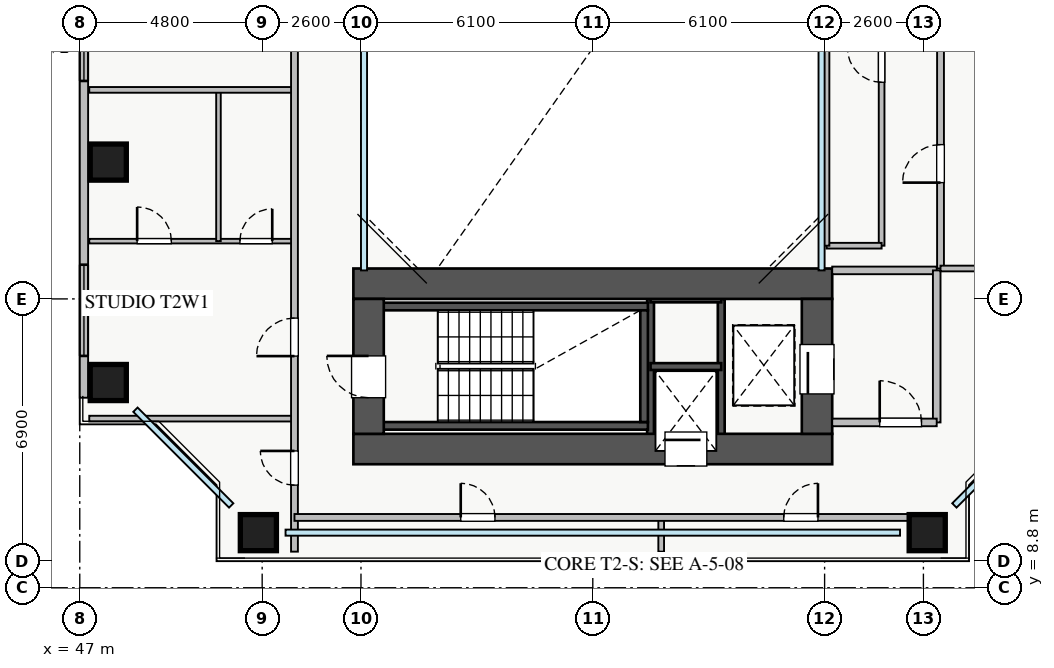
"""IFC4 building model, lengths in metres.
Left out: names, types, materials, properties, quantities, classifications, styles, units other than length and angle.
Written with IfcOpenShell. Run it as: python <this file> out.ifc"""

import sys

from ifc_helpers import new_model, si_unit, direction, frame, frame_2d, origin, origin_2d, place, context, subcontext, project, spatial, rectangle, extrude, source, transform, mapped, element, fill, save


model = new_model("IFC4")
c1 = context("Model", 3, precision=1e-05, world=origin(), true_north=direction((0.0, 1.0)))
c2 = subcontext(c1, "Body", "Model", "MODEL_VIEW")
j1 = project(units=[si_unit("LENGTHUNIT", "METRE"), si_unit("PLANEANGLEUNIT", "RADIAN")], contexts=[c1])
p1 = place(None, origin())
s1 = spatial("IfcSite", under=j1, at=p1, CompositionType="ELEMENT")
p2 = place(p1, origin())
s2 = spatial("IfcBuilding", under=s1, at=p2, CompositionType="ELEMENT")
p3 = place(p2, frame((0.0, 0.0, 50.25)))
s3 = spatial("IfcBuildingStorey", under=s2, at=p3, CompositionType="ELEMENT", Elevation=50.25)
for number, where, z_axis, x_axis in (
    (1, (62.02, 12.45, 0.0), (0.0, 0.0, 1.0), (0.0, 1.0, 0.0)),
    (2, (63.88, 12.45, 0.0), (0.0, 0.0, 1.0), (0.0, 1.0, 0.0)),
):
    element("IfcWall", number, at=place(p3, frame(where, z_axis=z_axis, x_axis=x_axis)), inside=s3, PredefinedType="SHEAR", context=c2, shape_type="SweptSolid", body=[
        extrude(rectangle(XDim=3.95, YDim=0.18, at=frame_2d((1.975, 0.0))), origin(), (0.0, 0.0, 1.0), 3.07),
    ])
for number, where, z_axis, x_axis in (
    (3, (62.02, 14.62, 0.0), (0.0, 0.0, 1.0), (1.0, 0.0, 0.0)),
    (4, (62.02, 16.4, 0.0), (0.0, 0.0, 1.0), (1.0, 0.0, 0.0)),
):
    element("IfcWall", number, at=place(p3, frame(where, z_axis=z_axis, x_axis=x_axis)), inside=s3, PredefinedType="SHEAR", context=c2, shape_type="SweptSolid", body=[
        extrude(rectangle(XDim=1.86, YDim=0.18, at=frame_2d((0.93, 0.0))), origin(), (0.0, 0.0, 1.0), 3.07),
    ])
for number, where, z_axis, x_axis in (
    (5, (54.8, 13.06, 0.0), (0.0, 0.0, 1.0), (1.0, 0.0, 0.0)),
    (6, (54.8, 16.2, 0.0), (0.0, 0.0, 1.0), (1.0, 0.0, 0.0)),
):
    element("IfcWall", number, at=place(p3, frame(where, z_axis=z_axis, x_axis=x_axis)), inside=s3, PredefinedType="SHEAR", context=c2, shape_type="SweptSolid", body=[
        extrude(rectangle(XDim=7.15, YDim=0.2, at=frame_2d((3.575, 0.0))), origin(), (0.0, 0.0, 1.0), 3.25),
    ])
p4 = place(p3, frame((61.85, 13.16, 0.0), z_axis=(0.0, 0.0, 1.0), x_axis=(0.0, 1.0, 0.0)))
e7 = element("IfcWall", 7, at=p4, inside=s3, PredefinedType="SHEAR", context=c2, shape_type="SweptSolid", body=[
    extrude(rectangle(XDim=2.94, YDim=0.2, at=frame_2d((1.47, 0.0))), origin(), (0.0, 0.0, 1.0), 3.25),
])
p5 = place(p3, frame((54.2, 12.45, 0.0), z_axis=(0.0, 0.0, 1.0), x_axis=(1.0, 0.0, 0.0)))
e8 = element("IfcWall", 8, at=p5, inside=s3, PredefinedType="SHEAR", context=c2, shape_type="SweptSolid", body=[
    extrude(rectangle(XDim=12.6, YDim=0.8, at=frame_2d((6.3, 0.0))), origin(), (0.0, 0.0, 1.0), 3.25),
])
p6 = place(p5, frame((8.2, 0.0, 0.0)))
e9 = element("IfcOpeningElement", 9, at=p6, cuts=e8, PredefinedType="OPENING", context=c2, shape_type="SweptSolid", body=[
    extrude(rectangle(XDim=1.1, YDim=2.05, at=frame_2d((0.55, 1.025))), frame((0.0, 0.41, 0.0), z_axis=(0.0, -1.0, 0.0), x_axis=(1.0, 0.0, 0.0)), (0.0, 0.0, 1.0), 0.82),
])
p7 = place(p3, frame((54.2, 16.8, 0.0), z_axis=(0.0, 0.0, 1.0), x_axis=(1.0, 0.0, 0.0)))
e10 = element("IfcWall", 10, at=p7, inside=s3, PredefinedType="SHEAR", context=c2, shape_type="SweptSolid", body=[
    extrude(rectangle(XDim=12.6, YDim=0.8, at=frame_2d((6.3, 0.0))), origin(), (0.0, 0.0, 1.0), 3.25),
])
p8 = place(p3, frame((54.6, 12.85, 0.0), z_axis=(0.0, 0.0, 1.0), x_axis=(0.0, 1.0, 0.0)))
e11 = element("IfcWall", 11, at=p8, inside=s3, PredefinedType="SHEAR", context=c2, shape_type="SweptSolid", body=[
    extrude(rectangle(XDim=3.55, YDim=0.8, at=frame_2d((1.775, 0.0))), origin(), (0.0, 0.0, 1.0), 3.25),
])
p9 = place(p8, frame((0.95, 0.0, 0.0)))
e12 = element("IfcOpeningElement", 12, at=p9, cuts=e11, PredefinedType="OPENING", context=c2, shape_type="SweptSolid", body=[
    extrude(rectangle(XDim=1.1, YDim=2.05, at=frame_2d((0.55, 1.025))), frame((0.0, 0.41, 0.0), z_axis=(0.0, -1.0, 0.0), x_axis=(1.0, 0.0, 0.0)), (0.0, 0.0, 1.0), 0.82),
])
p10 = place(p3, frame((66.4, 12.85, 0.0), z_axis=(0.0, 0.0, 1.0), x_axis=(0.0, 1.0, 0.0)))
e13 = element("IfcWall", 13, at=p10, inside=s3, PredefinedType="SHEAR", context=c2, shape_type="SweptSolid", body=[
    extrude(rectangle(XDim=3.55, YDim=0.8, at=frame_2d((1.775, 0.0))), origin(), (0.0, 0.0, 1.0), 3.25),
])
p11 = place(p10, frame((1.05, 0.0, 0.0)))
e14 = element("IfcOpeningElement", 14, at=p11, cuts=e13, PredefinedType="OPENING", context=c2, shape_type="SweptSolid", body=[
    extrude(rectangle(XDim=1.3, YDim=2.05, at=frame_2d((0.65, 1.025))), frame((0.0, 0.41, 0.0), z_axis=(0.0, -1.0, 0.0), x_axis=(1.0, 0.0, 0.0)), (0.0, 0.0, 1.0), 0.82),
])
m1 = source(origin(), c2, "Body", "SweptSolid", [
    extrude(rectangle(XDim=0.95, YDim=0.95, at=origin_2d()), origin(), (0.0, 0.0, 1.0), 3.25),
])
for number, where, z_axis, x_axis in (
    (15, (51.7, 10.25, 0.0), (0.0, 0.0, 1.0), (1.0, 0.0, 0.0)),
    (16, (69.3, 10.25, 0.0), (0.0, 0.0, 1.0), (1.0, 0.0, 0.0)),
    (17, (47.75, 14.2, 0.0), (0.0, 0.0, 1.0), (1.0, 0.0, 0.0)),
    (18, (47.75, 20.0, 0.0), (0.0, 0.0, 1.0), (1.0, 0.0, 0.0)),
):
    element("IfcColumn", number, at=place(p3, frame(where, z_axis=z_axis, x_axis=x_axis)), inside=s3, PredefinedType="COLUMN", context=c2, shape_type="MappedRepresentation", body=[
        mapped(m1, transform((0.0, 0.0, 0.0), x_axis=(1.0, 0.0, 0.0), y_axis=(0.0, 1.0, 0.0), z_axis=(0.0, 0.0, 1.0), scale=1.0)),
    ])
p12 = place(p3, frame((47.11, 13.8, 0.0), z_axis=(0.0, 0.0, 1.0), x_axis=(0.0, 1.0, 0.0)))
e19 = element("IfcWall", 19, at=p12, inside=s3, PredefinedType="STANDARD", context=c2, shape_type="SweptSolid", body=[
    extrude(rectangle(XDim=18.4, YDim=0.22, at=frame_2d((9.2, 0.0))), origin(), (0.0, 0.0, 1.0), 2.61),
])
p13 = place(p12, frame((1.1, 0.0, 0.9)))
e20 = element("IfcOpeningElement", 20, at=p13, cuts=e19, PredefinedType="OPENING", context=c2, shape_type="SweptSolid", body=[
    extrude(rectangle(XDim=2.4, YDim=1.48, at=frame_2d((1.2, 0.74))), frame((0.0, 0.12, 0.0), z_axis=(0.0, -1.0, 0.0), x_axis=(1.0, 0.0, 0.0)), (0.0, 0.0, 1.0), 0.24),
])
p14 = place(p12, frame((15.05, 0.0, 0.9)))
e21 = element("IfcOpeningElement", 21, at=p14, cuts=e19, PredefinedType="OPENING", context=c2, shape_type="SweptSolid", body=[
    extrude(rectangle(XDim=2.1, YDim=1.48, at=frame_2d((1.05, 0.74))), frame((0.0, 0.12, 0.0), z_axis=(0.0, -1.0, 0.0), x_axis=(1.0, 0.0, 0.0)), (0.0, 0.0, 1.0), 0.24),
])
p15 = place(p12, frame((8.335, 0.0, 0.9)))
e22 = element("IfcOpeningElement", 22, at=p15, cuts=e19, PredefinedType="OPENING", context=c2, shape_type="SweptSolid", body=[
    extrude(rectangle(XDim=0.9, YDim=1.2, at=frame_2d((0.45, 0.6))), frame((0.0, 0.12, 0.0), z_axis=(0.0, -1.0, 0.0), x_axis=(1.0, 0.0, 0.0)), (0.0, 0.0, 1.0), 0.24),
])
p16 = place(p3, frame((66.8, 17.15, 0.0), z_axis=(0.0, 0.0, 1.0), x_axis=(1.0, 0.0, 0.0)))
e23 = element("IfcWall", 23, at=p16, inside=s3, PredefinedType="PARTITIONING", context=c2, shape_type="SweptSolid", body=[
    extrude(rectangle(XDim=2.75, YDim=0.2, at=frame_2d((1.375, 0.0))), origin(), (0.0, 0.0, 1.0), 3.07),
])
p17 = place(p3, frame((69.55, 13.15, 0.0), z_axis=(0.0, 0.0, 1.0), x_axis=(0.0, 1.0, 0.0)))
e24 = element("IfcWall", 24, at=p17, inside=s3, PredefinedType="PARTITIONING", context=c2, shape_type="SweptSolid", body=[
    extrude(rectangle(XDim=4.0, YDim=0.2, at=frame_2d((2.0, 0.0))), origin(), (0.0, 0.0, 1.0), 2.615),
])
p18 = place(p3, frame((66.8, 13.15, 0.0), z_axis=(0.0, 0.0, 1.0), x_axis=(1.0, 0.0, 0.0)))
e25 = element("IfcWall", 25, at=p18, inside=s3, PredefinedType="PARTITIONING", context=c2, shape_type="SweptSolid", body=[
    extrude(rectangle(XDim=2.75, YDim=0.2, at=frame_2d((1.375, 0.0))), origin(), (0.0, 0.0, 1.0), 3.07),
])
p19 = place(p18, frame((1.25, 0.0, 0.0)))
e26 = element("IfcOpeningElement", 26, at=p19, cuts=e25, PredefinedType="OPENING", context=c2, shape_type="SweptSolid", body=[
    extrude(rectangle(XDim=1.1, YDim=2.05, at=frame_2d((0.55, 1.025))), frame((0.0, 0.11, 0.0), z_axis=(0.0, -1.0, 0.0), x_axis=(1.0, 0.0, 0.0)), (0.0, 0.0, 1.0), 0.22),
])
p20 = place(p3, frame((47.25, 13.25, 0.0), z_axis=(0.0, 0.0, 1.0), x_axis=(1.0, 0.0, 0.0)))
e27 = element("IfcWall", 27, at=p20, inside=s3, PredefinedType="PARTITIONING", context=c2, shape_type="SweptSolid", body=[
    extrude(rectangle(XDim=5.4, YDim=0.15, at=frame_2d((2.7, 0.0))), origin(), (0.0, 0.0, 1.0), 3.07),
])
p21 = place(p3, frame((47.25, 17.92, 0.0), z_axis=(0.0, 0.0, 1.0), x_axis=(1.0, 0.0, 0.0)))
e28 = element("IfcWall", 28, at=p21, inside=s3, PredefinedType="PLUMBINGWALL", context=c2, shape_type="SweptSolid", body=[
    extrude(rectangle(XDim=5.4, YDim=0.12, at=frame_2d((2.7, 0.0))), origin(), (0.0, 0.0, 1.0), 3.07),
])
p22 = place(p21, frame((1.26, 0.0, 0.0)))
e29 = element("IfcOpeningElement", 29, at=p22, cuts=e28, PredefinedType="OPENING", context=c2, shape_type="SweptSolid", body=[
    extrude(rectangle(XDim=0.9, YDim=2.05, at=frame_2d((0.45, 1.025))), frame((0.0, 0.07, 0.0), z_axis=(0.0, -1.0, 0.0), x_axis=(1.0, 0.0, 0.0)), (0.0, 0.0, 1.0), 0.14),
])
p23 = place(p21, frame((3.965, 0.0, 0.0)))
e30 = element("IfcOpeningElement", 30, at=p23, cuts=e28, PredefinedType="OPENING", context=c2, shape_type="SweptSolid", body=[
    extrude(rectangle(XDim=0.85, YDim=2.05, at=frame_2d((0.425, 1.025))), frame((0.0, 0.07, 0.0), z_axis=(0.0, -1.0, 0.0), x_axis=(1.0, 0.0, 0.0)), (0.0, 0.0, 1.0), 0.14),
])
p24 = place(p3, frame((50.65, 17.92, 0.0), z_axis=(0.0, 0.0, 1.0), x_axis=(0.0, 1.0, 0.0)))
e31 = element("IfcWall", 31, at=p24, inside=s3, PredefinedType="PLUMBINGWALL", context=c2, shape_type="SweptSolid", body=[
    extrude(rectangle(XDim=3.98, YDim=0.12, at=frame_2d((1.99, 0.0))), origin(), (0.0, 0.0, 1.0), 3.07),
])
p25 = place(p3, frame((47.25, 21.9, 0.0), z_axis=(0.0, 0.0, 1.0), x_axis=(1.0, 0.0, 0.0)))
e32 = element("IfcWall", 32, at=p25, inside=s3, PredefinedType="PARTITIONING", context=c2, shape_type="SweptSolid", body=[
    extrude(rectangle(XDim=5.4, YDim=0.15, at=frame_2d((2.7, 0.0))), origin(), (0.0, 0.0, 1.0), 3.07),
])
p26 = place(p3, frame((52.65, 9.75, 0.0), z_axis=(0.0, 0.0, 1.0), x_axis=(0.0, 1.0, 0.0)))
e33 = element("IfcWall", 33, at=p26, inside=s3, PredefinedType="PARTITIONING", context=c2, shape_type="SweptSolid", body=[
    extrude(rectangle(XDim=26.5, YDim=0.18, at=frame_2d((13.25, 0.0))), origin(), (0.0, 0.0, 1.0), 3.07),
])
p27 = place(p26, frame((23.85, 0.0, 0.0)))
e34 = element("IfcOpeningElement", 34, at=p27, cuts=e33, PredefinedType="OPENING", context=c2, shape_type="SweptSolid", body=[
    extrude(rectangle(XDim=0.9, YDim=2.05, at=frame_2d((0.45, 1.025))), frame((0.0, 0.1, 0.0), z_axis=(0.0, -1.0, 0.0), x_axis=(1.0, 0.0, 0.0)), (0.0, 0.0, 1.0), 0.2),
])
p28 = place(p26, frame((1.75, 0.0, 0.0)))
e35 = element("IfcOpeningElement", 35, at=p28, cuts=e33, PredefinedType="OPENING", context=c2, shape_type="SweptSolid", body=[
    extrude(rectangle(XDim=0.9, YDim=2.05, at=frame_2d((0.45, 1.025))), frame((0.0, 0.1, 0.0), z_axis=(0.0, -1.0, 0.0), x_axis=(1.0, 0.0, 0.0)), (0.0, 0.0, 1.0), 0.2),
])
p29 = place(p26, frame((5.145, 0.0, 0.0)))
e36 = element("IfcOpeningElement", 36, at=p29, cuts=e33, PredefinedType="OPENING", context=c2, shape_type="SweptSolid", body=[
    extrude(rectangle(XDim=1.0, YDim=2.05, at=frame_2d((0.5, 1.025))), frame((0.0, 0.1, 0.0), z_axis=(0.0, -1.0, 0.0), x_axis=(1.0, 0.0, 0.0)), (0.0, 0.0, 1.0), 0.2),
])
p30 = place(p26, frame((14.39, 0.0, 0.0)))
e37 = element("IfcOpeningElement", 37, at=p30, cuts=e33, PredefinedType="OPENING", context=c2, shape_type="SweptSolid", body=[
    extrude(rectangle(XDim=1.0, YDim=2.05, at=frame_2d((0.5, 1.025))), frame((0.0, 0.1, 0.0), z_axis=(0.0, -1.0, 0.0), x_axis=(1.0, 0.0, 0.0)), (0.0, 0.0, 1.0), 0.2),
])
p31 = place(p3, frame((69.65, 17.2, 0.0), z_axis=(0.0, 0.0, 1.0), x_axis=(0.0, 1.0, 0.0)))
e38 = element("IfcWall", 38, at=p31, inside=s3, PredefinedType="PARTITIONING", context=c2, shape_type="SweptSolid", body=[
    extrude(rectangle(XDim=11.6, YDim=0.18, at=frame_2d((5.8, 0.0))), origin(), (0.0, 0.0, 1.0), 3.07),
])
p32 = place(p31, frame((2.26, 0.0, 0.0)))
e39 = element("IfcOpeningElement", 39, at=p32, cuts=e38, PredefinedType="OPENING", context=c2, shape_type="SweptSolid", body=[
    extrude(rectangle(XDim=1.0, YDim=2.05, at=frame_2d((0.5, 1.025))), frame((0.0, 0.1, 0.0), z_axis=(0.0, -1.0, 0.0), x_axis=(1.0, 0.0, 0.0)), (0.0, 0.0, 1.0), 0.2),
])
p33 = place(p3, frame((69.65, 17.2, 0.0), z_axis=(0.0, 0.0, 1.0), x_axis=(1.0, 0.0, 0.0)))
e40 = element("IfcWall", 40, at=p33, inside=s3, PredefinedType="PARTITIONING", context=c2, shape_type="SweptSolid", body=[
    extrude(rectangle(XDim=4.1, YDim=0.15, at=frame_2d((2.05, 0.0))), origin(), (0.0, 0.0, 1.0), 3.07),
])
p34 = place(p3, frame((68.1, 17.8, 0.0), z_axis=(0.0, 0.0, 1.0), x_axis=(0.0, 1.0, 0.0)))
e41 = element("IfcWall", 41, at=p34, inside=s3, PredefinedType="PARTITIONING", context=c2, shape_type="SweptSolid", body=[
    extrude(rectangle(XDim=9.8, YDim=0.15, at=frame_2d((4.9, 0.0))), origin(), (0.0, 0.0, 1.0), 3.07),
])
p35 = place(p34, frame((4.3, 0.0, 0.0)))
e42 = element("IfcOpeningElement", 42, at=p35, cuts=e41, PredefinedType="OPENING", context=c2, shape_type="SweptSolid", body=[
    extrude(rectangle(XDim=0.9, YDim=2.05, at=frame_2d((0.45, 1.025))), frame((0.0, 0.085, 0.0), z_axis=(0.0, -1.0, 0.0), x_axis=(1.0, 0.0, 0.0)), (0.0, 0.0, 1.0), 0.17),
])
p36 = place(p3, frame((66.65, 17.8, 0.0), z_axis=(0.0, 0.0, 1.0), x_axis=(1.0, 0.0, 0.0)))
e43 = element("IfcWall", 43, at=p36, inside=s3, PredefinedType="PARTITIONING", context=c2, shape_type="SweptSolid", body=[
    extrude(rectangle(XDim=1.45, YDim=0.15, at=frame_2d((0.725, 0.0))), origin(), (0.0, 0.0, 1.0), 3.07),
])
p37 = place(p3, frame((66.65, 17.8, 0.0), z_axis=(0.0, 0.0, 1.0), x_axis=(0.0, 1.0, 0.0)))
e44 = element("IfcWall", 44, at=p37, inside=s3, PredefinedType="PARTITIONING", context=c2, shape_type="SweptSolid", body=[
    extrude(rectangle(XDim=9.8, YDim=0.15, at=frame_2d((4.9, 0.0))), origin(), (0.0, 0.0, 1.0), 2.665),
])
for number, where, z_axis, x_axis in (
    (45, (62.3, 9.75, 0.0), (0.0, 0.0, 1.0), (0.0, 1.0, 0.0)),
    (46, (69.65, 9.75, 0.0), (0.0, 0.0, 1.0), (0.0, 1.0, 0.0)),
):
    element("IfcWall", number, at=place(p3, frame(where, z_axis=z_axis, x_axis=x_axis)), inside=s3, PredefinedType="PARTITIONING", context=c2, shape_type="SweptSolid", body=[
        extrude(rectangle(XDim=0.9, YDim=0.15, at=frame_2d((0.45, 0.0))), origin(), (0.0, 0.0, 1.0), 3.07),
    ])
p38 = place(p3, frame((52.65, 10.65, 0.0), z_axis=(0.0, 0.0, 1.0), x_axis=(1.0, 0.0, 0.0)))
e47 = element("IfcWall", 47, at=p38, inside=s3, PredefinedType="PARTITIONING", context=c2, shape_type="SweptSolid", body=[
    extrude(rectangle(XDim=17.0, YDim=0.18, at=frame_2d((8.5, 0.0))), origin(), (0.0, 0.0, 1.0), 3.07),
])
p39 = place(p38, frame((4.375, 0.0, 0.0)))
e48 = element("IfcOpeningElement", 48, at=p39, cuts=e47, PredefinedType="OPENING", context=c2, shape_type="SweptSolid", body=[
    extrude(rectangle(XDim=0.9, YDim=2.05, at=frame_2d((0.45, 1.025))), frame((0.0, 0.1, 0.0), z_axis=(0.0, -1.0, 0.0), x_axis=(1.0, 0.0, 0.0)), (0.0, 0.0, 1.0), 0.2),
])
p40 = place(p38, frame((12.875, 0.0, 0.0)))
e49 = element("IfcOpeningElement", 49, at=p40, cuts=e47, PredefinedType="OPENING", context=c2, shape_type="SweptSolid", body=[
    extrude(rectangle(XDim=0.9, YDim=2.05, at=frame_2d((0.45, 1.025))), frame((0.0, 0.1, 0.0), z_axis=(0.0, -1.0, 0.0), x_axis=(1.0, 0.0, 0.0)), (0.0, 0.0, 1.0), 0.2),
])
m2 = source(origin(), c2, "Body", "SweptSolid", [
    extrude(rectangle(XDim=2.4, YDim=1.48, at=frame_2d((1.2, 0.74))), frame((0.0, 0.03, 0.0), z_axis=(0.0, -1.0, 0.0), x_axis=(1.0, 0.0, 0.0)), (0.0, 0.0, 1.0), 0.06),
])
p41 = place(p13, origin())
e50 = element("IfcWindow", 50, at=p41, inside=s3, PartitioningType="TRIPLE_PANEL_VERTICAL", PredefinedType="WINDOW", context=c2, shape_type="MappedRepresentation", body=[
    mapped(m2, transform((0.0, 0.0, 0.0), x_axis=(1.0, 0.0, 0.0), y_axis=(0.0, 1.0, 0.0), z_axis=(0.0, 0.0, 1.0), scale=1.0)),
])
fill(e20, e50)
m3 = source(origin(), c2, "Body", "SweptSolid", [
    extrude(rectangle(XDim=1.3, YDim=2.05, at=frame_2d((0.65, 1.025))), frame((0.0, 0.025, 0.0), z_axis=(0.0, -1.0, 0.0), x_axis=(1.0, 0.0, 0.0)), (0.0, 0.0, 1.0), 0.05),
])
p42 = place(p11, origin())
e51 = element("IfcDoor", 51, at=p42, inside=s3, OperationType="SLIDING_TO_RIGHT", PredefinedType="DOOR", context=c2, shape_type="MappedRepresentation", body=[
    mapped(m3, transform((0.0, 0.0, 0.0), x_axis=(1.0, 0.0, 0.0), y_axis=(0.0, 1.0, 0.0), z_axis=(0.0, 0.0, 1.0), scale=1.0)),
])
fill(e14, e51)
m4 = source(origin(), c2, "Body", "SweptSolid", [
    extrude(rectangle(XDim=1.1, YDim=2.05, at=frame_2d((0.55, 1.025))), frame((0.0, 0.025, 0.0), z_axis=(0.0, -1.0, 0.0), x_axis=(1.0, 0.0, 0.0)), (0.0, 0.0, 1.0), 0.05),
])
p43 = place(p9, origin())
e52 = element("IfcDoor", 52, at=p43, inside=s3, OperationType="SINGLE_SWING_RIGHT", PredefinedType="DOOR", context=c2, shape_type="MappedRepresentation", body=[
    mapped(m4, transform((0.0, 0.0, 0.0), x_axis=(1.0, 0.0, 0.0), y_axis=(0.0, 1.0, 0.0), z_axis=(0.0, 0.0, 1.0), scale=1.0)),
])
fill(e12, e52)
p44 = place(p6, origin())
e53 = element("IfcDoor", 53, at=p44, inside=s3, OperationType="SLIDING_TO_RIGHT", PredefinedType="DOOR", context=c2, shape_type="MappedRepresentation", body=[
    mapped(m4, transform((0.0, 0.0, 0.0), x_axis=(1.0, 0.0, 0.0), y_axis=(0.0, 1.0, 0.0), z_axis=(0.0, 0.0, 1.0), scale=1.0)),
])
fill(e9, e53)
p45 = place(p19, origin())
e54 = element("IfcDoor", 54, at=p45, inside=s3, OperationType="SINGLE_SWING_LEFT", PredefinedType="DOOR", context=c2, shape_type="MappedRepresentation", body=[
    mapped(m4, transform((0.0, 0.0, 0.0), x_axis=(1.0, 0.0, 0.0), y_axis=(0.0, 1.0, 0.0), z_axis=(0.0, 0.0, 1.0), scale=1.0)),
])
fill(e26, e54)
m5 = source(origin(), c2, "Body", "SweptSolid", [
    extrude(rectangle(XDim=0.9, YDim=2.05, at=frame_2d((0.45, 1.025))), frame((0.0, 0.025, 0.0), z_axis=(0.0, -1.0, 0.0), x_axis=(1.0, 0.0, 0.0)), (0.0, 0.0, 1.0), 0.05),
])
p46 = place(p22, origin())
e55 = element("IfcDoor", 55, at=p46, inside=s3, OperationType="SINGLE_SWING_LEFT", PredefinedType="DOOR", context=c2, shape_type="MappedRepresentation", body=[
    mapped(m5, transform((0.0, 0.0, 0.0), x_axis=(1.0, 0.0, 0.0), y_axis=(0.0, 1.0, 0.0), z_axis=(0.0, 0.0, 1.0), scale=1.0)),
])
fill(e29, e55)
m6 = source(origin(), c2, "Body", "SweptSolid", [
    extrude(rectangle(XDim=0.85, YDim=2.05, at=frame_2d((0.425, 1.025))), frame((0.0, 0.025, 0.0), z_axis=(0.0, -1.0, 0.0), x_axis=(1.0, 0.0, 0.0)), (0.0, 0.0, 1.0), 0.05),
])
p47 = place(p23, origin())
e56 = element("IfcDoor", 56, at=p47, inside=s3, OperationType="SINGLE_SWING_RIGHT", PredefinedType="DOOR", context=c2, shape_type="MappedRepresentation", body=[
    mapped(m6, transform((0.0, 0.0, 0.0), x_axis=(1.0, 0.0, 0.0), y_axis=(0.0, 1.0, 0.0), z_axis=(0.0, 0.0, 1.0), scale=1.0)),
])
fill(e30, e56)
p48 = place(p28, origin())
e57 = element("IfcDoor", 57, at=p48, inside=s3, OperationType="SINGLE_SWING_RIGHT", PredefinedType="DOOR", context=c2, shape_type="MappedRepresentation", body=[
    mapped(m5, transform((0.0, 0.0, 0.0), x_axis=(1.0, 0.0, 0.0), y_axis=(0.0, 1.0, 0.0), z_axis=(0.0, 0.0, 1.0), scale=1.0)),
])
fill(e35, e57)
m7 = source(origin(), c2, "Body", "SweptSolid", [
    extrude(rectangle(XDim=1.0, YDim=2.05, at=frame_2d((0.5, 1.025))), frame((0.0, 0.025, 0.0), z_axis=(0.0, -1.0, 0.0), x_axis=(1.0, 0.0, 0.0)), (0.0, 0.0, 1.0), 0.05),
])
p49 = place(p29, origin())
e58 = element("IfcDoor", 58, at=p49, inside=s3, OperationType="SINGLE_SWING_LEFT", PredefinedType="DOOR", context=c2, shape_type="MappedRepresentation", body=[
    mapped(m7, transform((0.0, 0.0, 0.0), x_axis=(1.0, 0.0, 0.0), y_axis=(0.0, 1.0, 0.0), z_axis=(0.0, 0.0, 1.0), scale=1.0)),
])
fill(e36, e58)
p50 = place(p32, origin())
e59 = element("IfcDoor", 59, at=p50, inside=s3, OperationType="SINGLE_SWING_LEFT", PredefinedType="DOOR", context=c2, shape_type="MappedRepresentation", body=[
    mapped(m7, transform((0.0, 0.0, 0.0), x_axis=(1.0, 0.0, 0.0), y_axis=(0.0, 1.0, 0.0), z_axis=(0.0, 0.0, 1.0), scale=1.0)),
])
fill(e39, e59)
p51 = place(p35, origin())
e60 = element("IfcDoor", 60, at=p51, inside=s3, OperationType="SINGLE_SWING_RIGHT", PredefinedType="DOOR", context=c2, shape_type="MappedRepresentation", body=[
    mapped(m5, transform((0.0, 0.0, 0.0), x_axis=(1.0, 0.0, 0.0), y_axis=(0.0, 1.0, 0.0), z_axis=(0.0, 0.0, 1.0), scale=1.0)),
])
fill(e42, e60)
p52 = place(p39, origin())
e61 = element("IfcDoor", 61, at=p52, inside=s3, OperationType="SINGLE_SWING_LEFT", PredefinedType="DOOR", context=c2, shape_type="MappedRepresentation", body=[
    mapped(m5, transform((0.0, 0.0, 0.0), x_axis=(1.0, 0.0, 0.0), y_axis=(0.0, 1.0, 0.0), z_axis=(0.0, 0.0, 1.0), scale=1.0)),
])
fill(e48, e61)
p53 = place(p40, origin())
e62 = element("IfcDoor", 62, at=p53, inside=s3, OperationType="SINGLE_SWING_RIGHT", PredefinedType="DOOR", context=c2, shape_type="MappedRepresentation", body=[
    mapped(m5, transform((0.0, 0.0, 0.0), x_axis=(1.0, 0.0, 0.0), y_axis=(0.0, 1.0, 0.0), z_axis=(0.0, 0.0, 1.0), scale=1.0)),
])
fill(e49, e62)
m8 = source(origin(), c2, "Body", "SweptSolid", [
    extrude(rectangle(XDim=0.9, YDim=1.2, at=frame_2d((0.45, 0.6))), frame((0.0, 0.03, 0.0), z_axis=(0.0, -1.0, 0.0), x_axis=(1.0, 0.0, 0.0)), (0.0, 0.0, 1.0), 0.06),
])
p54 = place(p15, origin())
e63 = element("IfcWindow", 63, at=p54, inside=s3, PartitioningType="SINGLE_PANEL", PredefinedType="WINDOW", context=c2, shape_type="MappedRepresentation", body=[
    mapped(m8, transform((0.0, 0.0, 0.0), x_axis=(1.0, 0.0, 0.0), y_axis=(0.0, 1.0, 0.0), z_axis=(0.0, 0.0, 1.0), scale=1.0)),
])
fill(e22, e63)
save(model, sys.argv[1])
